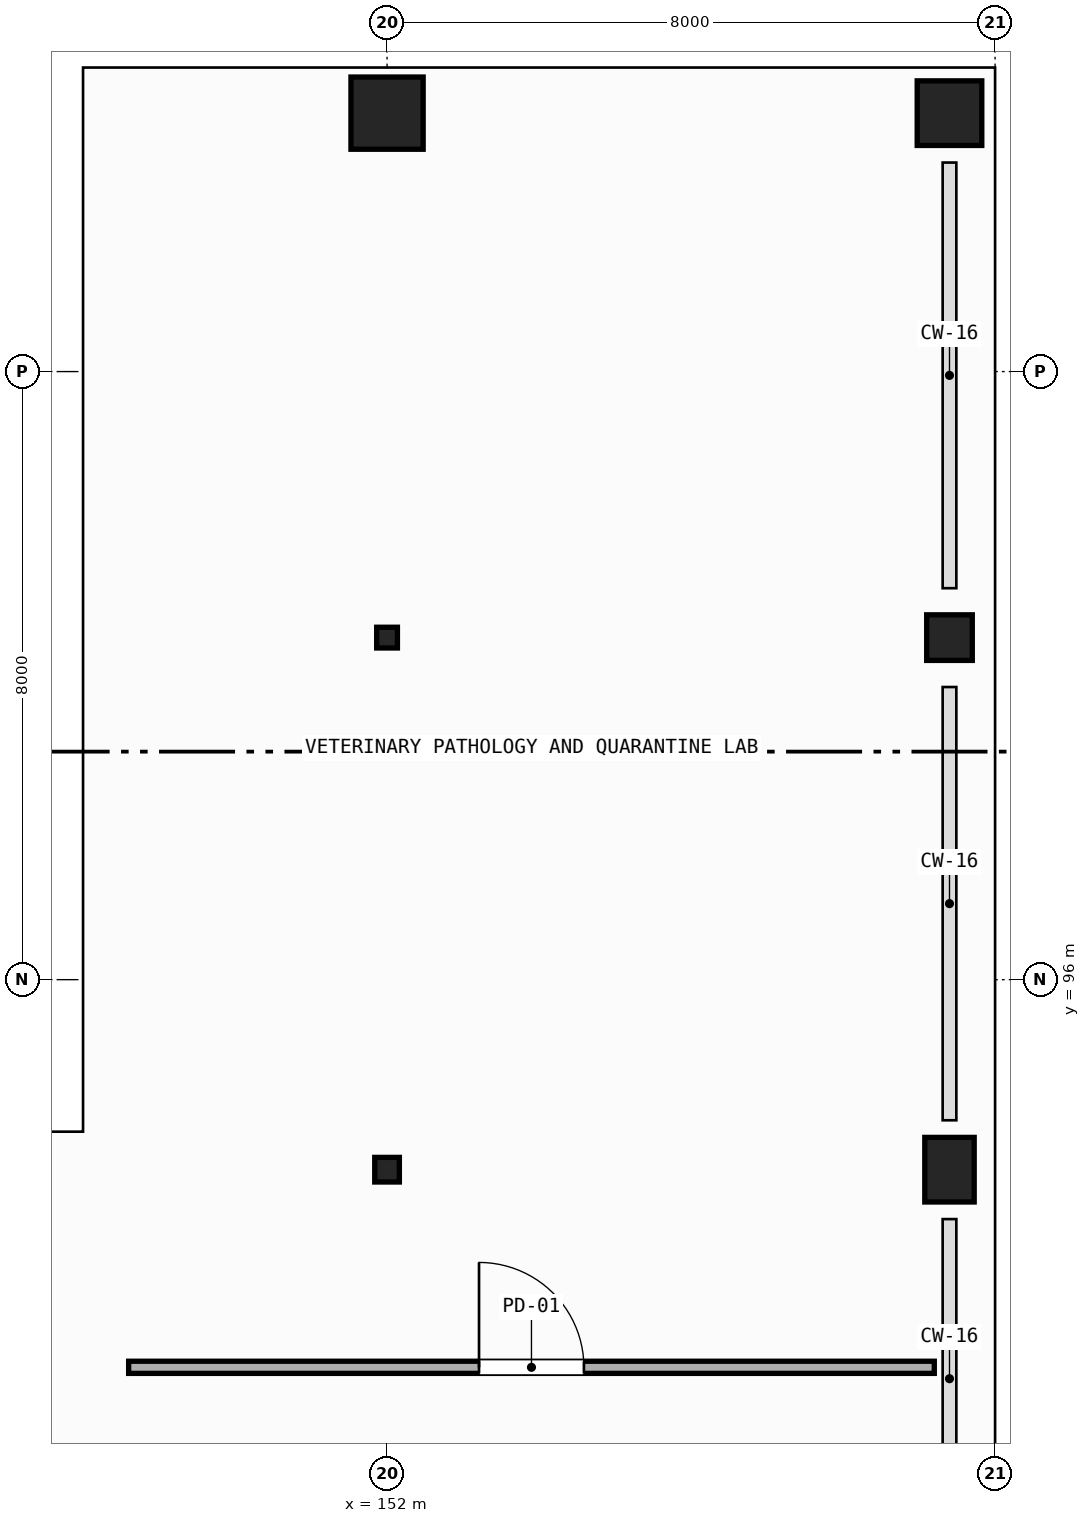
"""IFC4 building model, lengths in metres.
Left out: names, types, materials, properties, quantities, classifications, styles, units other than length and angle.
Written with IfcOpenShell. Run it as: python <this file> out.ifc"""

import sys

from ifc_helpers import new_model, si_unit, direction, frame, frame_2d, origin, origin_2d, place, context, subcontext, project, spatial, rectangle, circle, hollow_circle, extrude, element, fill, save


model = new_model("IFC4")
c1 = context("Model", 3, precision=1e-05, world=origin(), true_north=direction((0.0, 1.0)))
c2 = subcontext(c1, "Body", "Model", "MODEL_VIEW")
j1 = project(units=[si_unit("LENGTHUNIT", "METRE"), si_unit("PLANEANGLEUNIT", "RADIAN")], contexts=[c1])
p1 = place(None, origin())
s1 = spatial("IfcSite", under=j1, at=p1, CompositionType="ELEMENT")
p2 = place(p1, origin())
s2 = spatial("IfcBuilding", under=s1, at=p2, CompositionType="ELEMENT")
p3 = place(p2, origin())
s3 = spatial("IfcBuildingStorey", under=s2, at=p3, CompositionType="ELEMENT", Elevation=0.0)
p4 = place(p3, frame((152.0, 93.5, 0.0), z_axis=(0.0, 0.0, 1.0), x_axis=(0.0, 1.0, 0.0)))
e1 = element("IfcColumn", 1, at=p4, inside=s3, PredefinedType="COLUMN", context=c2, shape_type="SweptSolid", body=[
    extrude(hollow_circle(Radius=0.162, WallThickness=0.012, at=origin_2d()), origin(), (0.0, 0.0, 1.0), 5.12),
])
p5 = place(p3, frame((152.0, 100.5, 0.0), z_axis=(0.0, 0.0, 1.0), x_axis=(1.0, 0.0, 0.0)))
e2 = element("IfcColumn", 2, at=p5, inside=s3, PredefinedType="COLUMN", context=c2, shape_type="SweptSolid", body=[
    extrude(hollow_circle(Radius=0.136, WallThickness=0.012, at=origin_2d()), origin(), (0.0, 0.0, 1.0), 5.12),
])
p6 = place(p3, frame((152.0, 107.4, 0.0), z_axis=(0.0, 0.0, 1.0), x_axis=(0.0, 1.0, 0.0)))
e3 = element("IfcColumn", 3, at=p6, inside=s3, PredefinedType="COLUMN", context=c2, shape_type="SweptSolid", body=[
    extrude(rectangle(XDim=0.95, YDim=0.95, at=origin_2d()), origin(), (0.0, 0.0, 1.0), 5.12),
])
p7 = place(p3, frame((159.4, 93.5, 0.0), z_axis=(0.0, 0.0, 1.0), x_axis=(1.0, 0.0, 0.0)))
e4 = element("IfcColumn", 4, at=p7, inside=s3, PredefinedType="PILASTER", context=c2, shape_type="SweptSolid", body=[
    extrude(rectangle(XDim=0.65, YDim=0.85, at=origin_2d()), origin(), (0.0, 0.0, 1.0), 5.12),
])
p8 = place(p3, frame((159.4, 100.5, 0.0), z_axis=(0.0, 0.0, 1.0), x_axis=(0.0, 1.0, 0.0)))
e5 = element("IfcColumn", 5, at=p8, inside=s3, PredefinedType="COLUMN", context=c2, shape_type="SweptSolid", body=[
    extrude(rectangle(XDim=0.6, YDim=0.6, at=origin_2d()), origin(), (0.0, 0.0, 1.0), 5.12),
])
p9 = place(p3, frame((159.4, 107.4, 0.0), z_axis=(0.0, 0.0, 1.0), x_axis=(1.0, 0.0, 0.0)))
e6 = element("IfcColumn", 6, at=p9, inside=s3, PredefinedType="COLUMN", context=c2, shape_type="SweptSolid", body=[
    extrude(circle(Radius=0.425, at=origin_2d()), origin(), (0.0, 0.0, 1.0), 5.12),
])
p10 = place(p3, frame((148.6, 90.9, 0.0), z_axis=(0.0, 0.0, 1.0), x_axis=(1.0, 0.0, 0.0)))
e7 = element("IfcWall", 7, at=p10, inside=s3, PredefinedType="PARTITIONING", context=c2, shape_type="SweptSolid", body=[
    extrude(rectangle(XDim=10.6, YDim=0.16, at=frame_2d((5.3, 0.0))), origin(), (0.0, 0.0, 1.0), 4.29),
])
p11 = place(p10, frame((4.61, 0.0, 0.0)))
e8 = element("IfcOpeningElement", 8, at=p11, cuts=e7, PredefinedType="OPENING", context=c2, shape_type="SweptSolid", body=[
    extrude(rectangle(XDim=1.38, YDim=2.25, at=frame_2d((0.69, 1.125))), frame((0.0, 0.09, 0.0), z_axis=(0.0, -1.0, 0.0), x_axis=(1.0, 0.0, 0.0)), (0.0, 0.0, 1.0), 0.18),
])
p12 = place(p11, origin())
e9 = element("IfcDoor", 9, at=p12, inside=s3, OperationType="SINGLE_SWING_LEFT", PredefinedType="DOOR", context=c2, shape_type="SweptSolid", body=[
    extrude(rectangle(XDim=1.38, YDim=2.25, at=frame_2d((0.69, 1.125))), frame((0.0, 0.025, 0.0), z_axis=(0.0, -1.0, 0.0), x_axis=(1.0, 0.0, 0.0)), (0.0, 0.0, 1.0), 0.05),
])
fill(e8, e9)
save(model, sys.argv[1])
